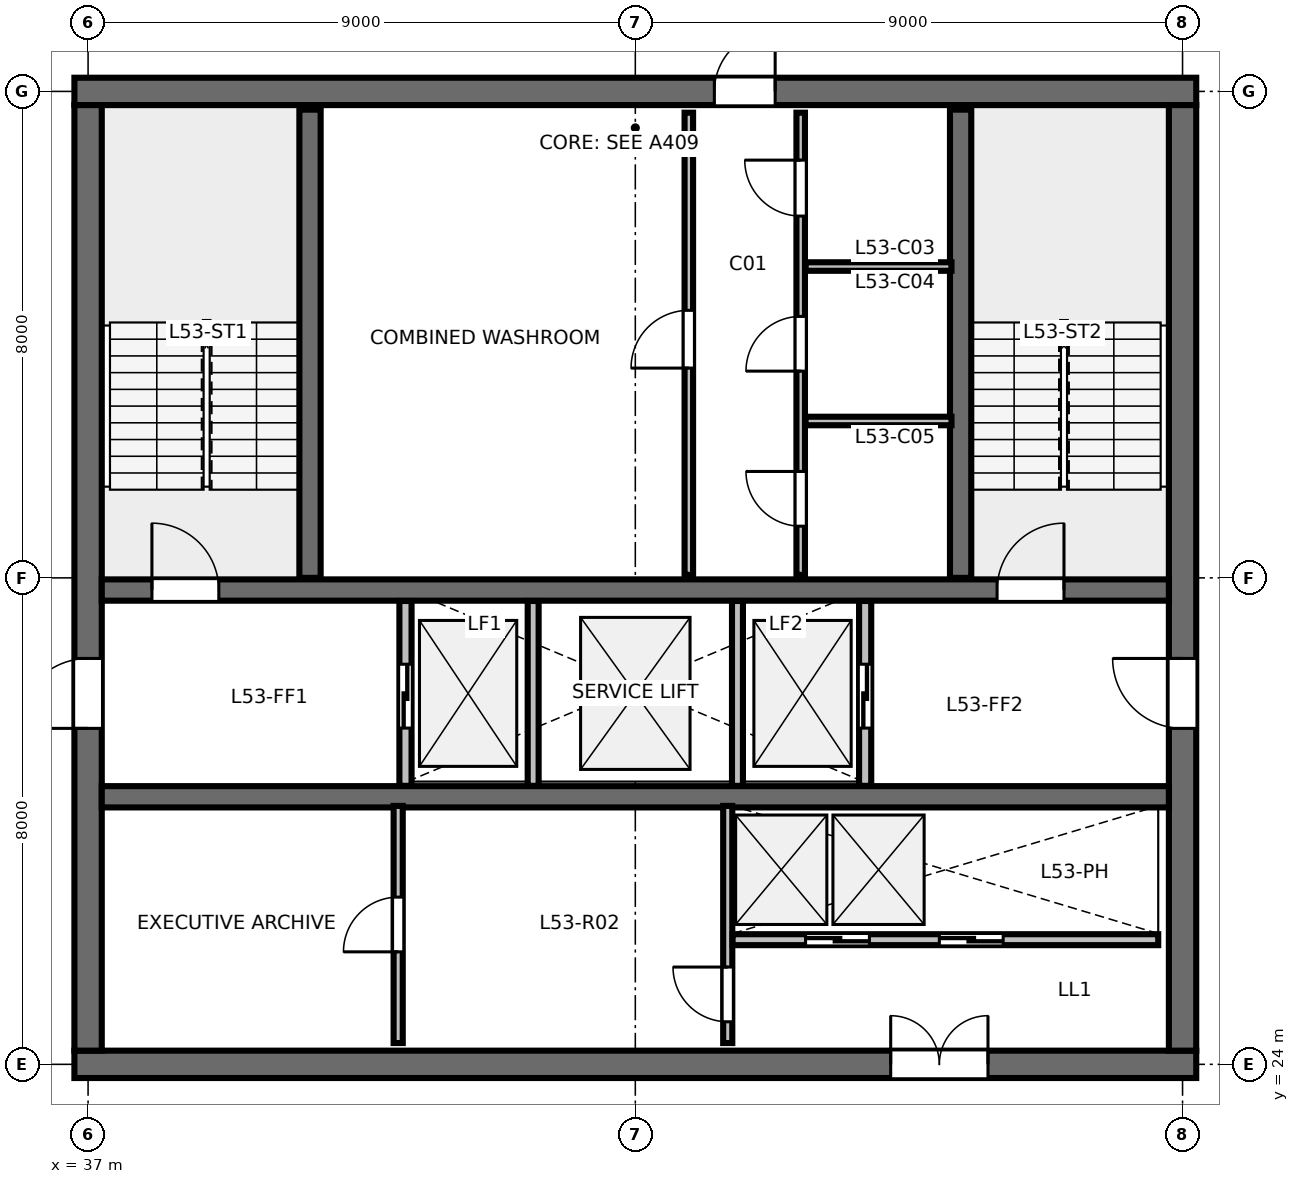
"""IFC4 building model, lengths in metres.
Left out: names, types, materials, properties, quantities, classifications, styles, units other than length and angle.
Written with IfcOpenShell. Run it as: python <this file> out.ifc"""

import sys

from ifc_helpers import new_model, si_unit, direction, frame, frame_2d, origin, place, context, subcontext, project, spatial, rectangle, extrude, element, fill, save


model = new_model("IFC4")
c1 = context("Model", 3, precision=1e-05, world=origin(), true_north=direction((0.0, 1.0)))
c2 = subcontext(c1, "Body", "Model", "MODEL_VIEW")
j1 = project(units=[si_unit("LENGTHUNIT", "METRE"), si_unit("PLANEANGLEUNIT", "RADIAN")], contexts=[c1])
p1 = place(None, origin())
s1 = spatial("IfcSite", under=j1, at=p1, CompositionType="ELEMENT")
p2 = place(p1, origin())
s2 = spatial("IfcBuilding", under=s1, at=p2, CompositionType="ELEMENT")
p3 = place(p2, frame((0.0, 0.0, 202.2)))
s3 = spatial("IfcBuildingStorey", under=s2, at=p3, CompositionType="ELEMENT", Elevation=202.2)
p4 = place(p3, frame((36.775, 24.0, 0.0), z_axis=(0.0, 0.0, 1.0), x_axis=(1.0, 0.0, 0.0)))
e1 = element("IfcWall", 1, at=p4, inside=s3, PredefinedType="SHEAR", context=c2, shape_type="SweptSolid", body=[
    extrude(rectangle(XDim=18.45, YDim=0.45, at=frame_2d((9.225, 0.0))), origin(), (0.0, 0.0, 1.0), 3.36),
])
p5 = place(p4, frame((13.425, 0.0, 0.0)))
e2 = element("IfcOpeningElement", 2, at=p5, cuts=e1, PredefinedType="OPENING", context=c2, shape_type="SweptSolid", body=[
    extrude(rectangle(XDim=1.6, YDim=2.15, at=frame_2d((0.8, 1.075))), frame((0.0, 0.235, 0.0), z_axis=(0.0, -1.0, 0.0), x_axis=(1.0, 0.0, 0.0)), (0.0, 0.0, 1.0), 0.47),
])
p6 = place(p3, frame((36.775, 40.0, 0.0), z_axis=(0.0, 0.0, 1.0), x_axis=(1.0, 0.0, 0.0)))
e3 = element("IfcWall", 3, at=p6, inside=s3, PredefinedType="SHEAR", context=c2, shape_type="SweptSolid", body=[
    extrude(rectangle(XDim=18.45, YDim=0.45, at=frame_2d((9.225, 0.0))), origin(), (0.0, 0.0, 1.0), 3.36),
])
p7 = place(p6, frame((10.525, 0.0, 0.0)))
e4 = element("IfcOpeningElement", 4, at=p7, cuts=e3, PredefinedType="OPENING", context=c2, shape_type="SweptSolid", body=[
    extrude(rectangle(XDim=1.0, YDim=2.15, at=frame_2d((0.5, 1.075))), frame((0.0, 0.235, 0.0), z_axis=(0.0, -1.0, 0.0), x_axis=(1.0, 0.0, 0.0)), (0.0, 0.0, 1.0), 0.47),
])
p8 = place(p3, frame((37.0, 24.225, 0.0), z_axis=(0.0, 0.0, 1.0), x_axis=(0.0, 1.0, 0.0)))
e5 = element("IfcWall", 5, at=p8, inside=s3, PredefinedType="SHEAR", context=c2, shape_type="SweptSolid", body=[
    extrude(rectangle(XDim=15.55, YDim=0.45, at=frame_2d((7.775, 0.0))), origin(), (0.0, 0.0, 1.0), 3.36),
])
p9 = place(p8, frame((5.3, 0.0, 0.0)))
e6 = element("IfcOpeningElement", 6, at=p9, cuts=e5, PredefinedType="OPENING", context=c2, shape_type="SweptSolid", body=[
    extrude(rectangle(XDim=1.15, YDim=2.15, at=frame_2d((0.575, 1.075))), frame((0.0, 0.235, 0.0), z_axis=(0.0, -1.0, 0.0), x_axis=(1.0, 0.0, 0.0)), (0.0, 0.0, 1.0), 0.47),
])
p10 = place(p3, frame((55.0, 24.225, 0.0), z_axis=(0.0, 0.0, 1.0), x_axis=(0.0, 1.0, 0.0)))
e7 = element("IfcWall", 7, at=p10, inside=s3, PredefinedType="SHEAR", context=c2, shape_type="SweptSolid", body=[
    extrude(rectangle(XDim=15.55, YDim=0.45, at=frame_2d((7.775, 0.0))), origin(), (0.0, 0.0, 1.0), 3.36),
])
p11 = place(p10, frame((5.3, 0.0, 0.0)))
e8 = element("IfcOpeningElement", 8, at=p11, cuts=e7, PredefinedType="OPENING", context=c2, shape_type="SweptSolid", body=[
    extrude(rectangle(XDim=1.15, YDim=2.15, at=frame_2d((0.575, 1.075))), frame((0.0, 0.235, 0.0), z_axis=(0.0, -1.0, 0.0), x_axis=(1.0, 0.0, 0.0)), (0.0, 0.0, 1.0), 0.47),
])
p12 = place(p3, frame((37.225, 31.8, 0.0), z_axis=(0.0, 0.0, 1.0), x_axis=(1.0, 0.0, 0.0)))
e9 = element("IfcWall", 9, at=p12, inside=s3, PredefinedType="SHEAR", context=c2, shape_type="SweptSolid", body=[
    extrude(rectangle(XDim=17.55, YDim=0.35, at=frame_2d((8.775, 0.0))), origin(), (0.0, 0.0, 1.0), 3.36),
])
p13 = place(p12, frame((0.825, 0.0, 0.0)))
e10 = element("IfcOpeningElement", 10, at=p13, cuts=e9, PredefinedType="OPENING", context=c2, shape_type="SweptSolid", body=[
    extrude(rectangle(XDim=1.1, YDim=2.15, at=frame_2d((0.55, 1.075))), frame((0.0, 0.185, 0.0), z_axis=(0.0, -1.0, 0.0), x_axis=(1.0, 0.0, 0.0)), (0.0, 0.0, 1.0), 0.37),
])
p14 = place(p12, frame((14.725, 0.0, 0.0)))
e11 = element("IfcOpeningElement", 11, at=p14, cuts=e9, PredefinedType="OPENING", context=c2, shape_type="SweptSolid", body=[
    extrude(rectangle(XDim=1.1, YDim=2.15, at=frame_2d((0.55, 1.075))), frame((0.0, 0.185, 0.0), z_axis=(0.0, -1.0, 0.0), x_axis=(1.0, 0.0, 0.0)), (0.0, 0.0, 1.0), 0.37),
])
p15 = place(p3, frame((37.225, 28.4, 0.0), z_axis=(0.0, 0.0, 1.0), x_axis=(1.0, 0.0, 0.0)))
e12 = element("IfcWall", 12, at=p15, inside=s3, PredefinedType="SHEAR", context=c2, shape_type="SweptSolid", body=[
    extrude(rectangle(XDim=17.55, YDim=0.35, at=frame_2d((8.775, 0.0))), origin(), (0.0, 0.0, 1.0), 3.36),
])
for number, where, z_axis, x_axis in (
    (13, (40.65, 32.0, 0.0), (0.0, 0.0, 1.0), (0.0, 1.0, 0.0)),
    (14, (51.35, 32.0, 0.0), (0.0, 0.0, 1.0), (0.0, 1.0, 0.0)),
):
    element("IfcWall", number, at=place(p3, frame(where, z_axis=z_axis, x_axis=x_axis)), inside=s3, PredefinedType="SHEAR", context=c2, shape_type="SweptSolid", body=[
        extrude(rectangle(XDim=7.7, YDim=0.35, at=frame_2d((3.85, 0.0))), origin(), (0.0, 0.0, 1.0), 3.6),
    ])
p16 = place(p3, frame((46.88, 32.05, 0.0), z_axis=(0.0, 0.0, 1.0), x_axis=(0.0, 1.0, 0.0)))
e15 = element("IfcWall", 15, at=p16, inside=s3, PredefinedType="PARTITIONING", context=c2, shape_type="SweptSolid", body=[
    extrude(rectangle(XDim=7.6, YDim=0.14, at=frame_2d((3.8, 0.0))), origin(), (0.0, 0.0, 1.0), 3.375),
])
p17 = place(p16, frame((3.4, 0.0, 0.0)))
e16 = element("IfcOpeningElement", 16, at=p17, cuts=e15, PredefinedType="OPENING", context=c2, shape_type="SweptSolid", body=[
    extrude(rectangle(XDim=0.95, YDim=2.15, at=frame_2d((0.475, 1.075))), frame((0.0, 0.08, 0.0), z_axis=(0.0, -1.0, 0.0), x_axis=(1.0, 0.0, 0.0)), (0.0, 0.0, 1.0), 0.16),
])
p18 = place(p3, frame((48.72, 32.05, 0.0), z_axis=(0.0, 0.0, 1.0), x_axis=(0.0, 1.0, 0.0)))
e17 = element("IfcWall", 17, at=p18, inside=s3, PredefinedType="PARTITIONING", context=c2, shape_type="SweptSolid", body=[
    extrude(rectangle(XDim=7.6, YDim=0.14, at=frame_2d((3.8, 0.0))), origin(), (0.0, 0.0, 1.0), 3.375),
])
p19 = place(p18, frame((0.8, 0.0, 0.0)))
e18 = element("IfcOpeningElement", 18, at=p19, cuts=e17, PredefinedType="OPENING", context=c2, shape_type="SweptSolid", body=[
    extrude(rectangle(XDim=0.9, YDim=2.15, at=frame_2d((0.45, 1.075))), frame((0.0, 0.08, 0.0), z_axis=(0.0, -1.0, 0.0), x_axis=(1.0, 0.0, 0.0)), (0.0, 0.0, 1.0), 0.16),
])
p20 = place(p18, frame((3.35, 0.0, 0.0)))
e19 = element("IfcOpeningElement", 19, at=p20, cuts=e17, PredefinedType="OPENING", context=c2, shape_type="SweptSolid", body=[
    extrude(rectangle(XDim=0.9, YDim=2.15, at=frame_2d((0.45, 1.075))), frame((0.0, 0.08, 0.0), z_axis=(0.0, -1.0, 0.0), x_axis=(1.0, 0.0, 0.0)), (0.0, 0.0, 1.0), 0.16),
])
p21 = place(p18, frame((5.9, 0.0, 0.0)))
e20 = element("IfcOpeningElement", 20, at=p21, cuts=e17, PredefinedType="OPENING", context=c2, shape_type="SweptSolid", body=[
    extrude(rectangle(XDim=0.92, YDim=2.15, at=frame_2d((0.46, 1.075))), frame((0.0, 0.08, 0.0), z_axis=(0.0, -1.0, 0.0), x_axis=(1.0, 0.0, 0.0)), (0.0, 0.0, 1.0), 0.16),
])
for number, where, z_axis, x_axis in (
    (21, (48.8, 34.58, 0.0), (0.0, 0.0, 1.0), (1.0, 0.0, 0.0)),
    (22, (48.8, 37.12, 0.0), (0.0, 0.0, 1.0), (1.0, 0.0, 0.0)),
):
    element("IfcWall", number, at=place(p3, frame(where, z_axis=z_axis, x_axis=x_axis)), inside=s3, PredefinedType="PARTITIONING", context=c2, shape_type="SweptSolid", body=[
        extrude(rectangle(XDim=2.4, YDim=0.14, at=frame_2d((1.2, 0.0))), origin(), (0.0, 0.0, 1.0), 3.375),
    ])
p22 = place(p3, frame((42.22, 28.58, 0.0), z_axis=(0.0, 0.0, 1.0), x_axis=(0.0, 1.0, 0.0)))
e23 = element("IfcWall", 23, at=p22, inside=s3, PredefinedType="PARTITIONING", context=c2, shape_type="SweptSolid", body=[
    extrude(rectangle(XDim=3.04, YDim=0.2, at=frame_2d((1.52, 0.0))), origin(), (0.0, 0.0, 1.0), 3.375),
])
p23 = place(p22, frame((0.95, 0.0, 0.0)))
e24 = element("IfcOpeningElement", 24, at=p23, cuts=e23, PredefinedType="OPENING", context=c2, shape_type="SweptSolid", body=[
    extrude(rectangle(XDim=1.05, YDim=2.15, at=frame_2d((0.525, 1.075))), frame((0.0, 0.11, 0.0), z_axis=(0.0, -1.0, 0.0), x_axis=(1.0, 0.0, 0.0)), (0.0, 0.0, 1.0), 0.22),
])
p24 = place(p3, frame((49.78, 28.58, 0.0), z_axis=(0.0, 0.0, 1.0), x_axis=(0.0, 1.0, 0.0)))
e25 = element("IfcWall", 25, at=p24, inside=s3, PredefinedType="PARTITIONING", context=c2, shape_type="SweptSolid", body=[
    extrude(rectangle(XDim=3.04, YDim=0.2, at=frame_2d((1.52, 0.0))), origin(), (0.0, 0.0, 1.0), 3.375),
])
p25 = place(p24, frame((0.95, 0.0, 0.0)))
e26 = element("IfcOpeningElement", 26, at=p25, cuts=e25, PredefinedType="OPENING", context=c2, shape_type="SweptSolid", body=[
    extrude(rectangle(XDim=1.05, YDim=2.15, at=frame_2d((0.525, 1.075))), frame((0.0, 0.11, 0.0), z_axis=(0.0, -1.0, 0.0), x_axis=(1.0, 0.0, 0.0)), (0.0, 0.0, 1.0), 0.22),
])
for number, where, z_axis, x_axis in (
    (27, (44.32, 28.58, 0.0), (0.0, 0.0, 1.0), (0.0, 1.0, 0.0)),
    (28, (47.68, 28.58, 0.0), (0.0, 0.0, 1.0), (0.0, 1.0, 0.0)),
):
    element("IfcWall", number, at=place(p3, frame(where, z_axis=z_axis, x_axis=x_axis)), inside=s3, PredefinedType="PARTITIONING", context=c2, shape_type="SweptSolid", body=[
        extrude(rectangle(XDim=3.04, YDim=0.18, at=frame_2d((1.52, 0.0))), origin(), (0.0, 0.0, 1.0), 3.375),
    ])
p26 = place(p3, frame((42.1, 24.35, 0.0), z_axis=(0.0, 0.0, 1.0), x_axis=(0.0, 1.0, 0.0)))
e29 = element("IfcWall", 29, at=p26, inside=s3, PredefinedType="PARTITIONING", context=c2, shape_type="SweptSolid", body=[
    extrude(rectangle(XDim=3.9, YDim=0.15, at=frame_2d((1.95, 0.0))), origin(), (0.0, 0.0, 1.0), 3.375),
])
p27 = place(p26, frame((1.5, 0.0, 0.0)))
e30 = element("IfcOpeningElement", 30, at=p27, cuts=e29, PredefinedType="OPENING", context=c2, shape_type="SweptSolid", body=[
    extrude(rectangle(XDim=0.9, YDim=2.15, at=frame_2d((0.45, 1.075))), frame((0.0, 0.085, 0.0), z_axis=(0.0, -1.0, 0.0), x_axis=(1.0, 0.0, 0.0)), (0.0, 0.0, 1.0), 0.17),
])
p28 = place(p3, frame((47.52, 24.35, 0.0), z_axis=(0.0, 0.0, 1.0), x_axis=(0.0, 1.0, 0.0)))
e31 = element("IfcWall", 31, at=p28, inside=s3, PredefinedType="PARTITIONING", context=c2, shape_type="SweptSolid", body=[
    extrude(rectangle(XDim=3.9, YDim=0.15, at=frame_2d((1.95, 0.0))), origin(), (0.0, 0.0, 1.0), 3.375),
])
p29 = place(p28, frame((0.35, 0.0, 0.0)))
e32 = element("IfcOpeningElement", 32, at=p29, cuts=e31, PredefinedType="OPENING", context=c2, shape_type="SweptSolid", body=[
    extrude(rectangle(XDim=0.9, YDim=2.15, at=frame_2d((0.45, 1.075))), frame((0.0, 0.085, 0.0), z_axis=(0.0, -1.0, 0.0), x_axis=(1.0, 0.0, 0.0)), (0.0, 0.0, 1.0), 0.17),
])
p30 = place(p3, frame((47.6, 26.05, 0.0), z_axis=(0.0, 0.0, 1.0), x_axis=(1.0, 0.0, 0.0)))
e33 = element("IfcWall", 33, at=p30, inside=s3, PredefinedType="PARTITIONING", context=c2, shape_type="SweptSolid", body=[
    extrude(rectangle(XDim=7.0, YDim=0.18, at=frame_2d((3.5, 0.0))), origin(), (0.0, 0.0, 1.0), 3.375),
])
p31 = place(p30, frame((1.2, 0.0, 0.0)))
e34 = element("IfcOpeningElement", 34, at=p31, cuts=e33, PredefinedType="OPENING", context=c2, shape_type="SweptSolid", body=[
    extrude(rectangle(XDim=1.05, YDim=2.15, at=frame_2d((0.525, 1.075))), frame((0.0, 0.1, 0.0), z_axis=(0.0, -1.0, 0.0), x_axis=(1.0, 0.0, 0.0)), (0.0, 0.0, 1.0), 0.2),
])
p32 = place(p30, frame((3.4, 0.0, 0.0)))
e35 = element("IfcOpeningElement", 35, at=p32, cuts=e33, PredefinedType="OPENING", context=c2, shape_type="SweptSolid", body=[
    extrude(rectangle(XDim=1.05, YDim=2.15, at=frame_2d((0.525, 1.075))), frame((0.0, 0.1, 0.0), z_axis=(0.0, -1.0, 0.0), x_axis=(1.0, 0.0, 0.0)), (0.0, 0.0, 1.0), 0.2),
])
p33 = place(p13, origin())
e36 = element("IfcDoor", 36, at=p33, inside=s3, OperationType="SINGLE_SWING_LEFT", PredefinedType="DOOR", context=c2, shape_type="SweptSolid", body=[
    extrude(rectangle(XDim=1.1, YDim=2.15, at=frame_2d((0.55, 1.075))), frame((0.0, 0.025, 0.0), z_axis=(0.0, -1.0, 0.0), x_axis=(1.0, 0.0, 0.0)), (0.0, 0.0, 1.0), 0.05),
])
fill(e10, e36)
p34 = place(p14, origin())
e37 = element("IfcDoor", 37, at=p34, inside=s3, OperationType="SINGLE_SWING_RIGHT", PredefinedType="DOOR", context=c2, shape_type="SweptSolid", body=[
    extrude(rectangle(XDim=1.1, YDim=2.15, at=frame_2d((0.55, 1.075))), frame((0.0, 0.025, 0.0), z_axis=(0.0, -1.0, 0.0), x_axis=(1.0, 0.0, 0.0)), (0.0, 0.0, 1.0), 0.05),
])
fill(e11, e37)
p35 = place(p7, origin())
e38 = element("IfcDoor", 38, at=p35, inside=s3, OperationType="SINGLE_SWING_RIGHT", PredefinedType="DOOR", context=c2, shape_type="SweptSolid", body=[
    extrude(rectangle(XDim=1.0, YDim=2.15, at=frame_2d((0.5, 1.075))), frame((0.0, 0.025, 0.0), z_axis=(0.0, -1.0, 0.0), x_axis=(1.0, 0.0, 0.0)), (0.0, 0.0, 1.0), 0.05),
])
fill(e4, e38)
p36 = place(p9, origin())
e39 = element("IfcDoor", 39, at=p36, inside=s3, OperationType="SINGLE_SWING_LEFT", PredefinedType="DOOR", context=c2, shape_type="SweptSolid", body=[
    extrude(rectangle(XDim=1.15, YDim=2.15, at=frame_2d((0.575, 1.075))), frame((0.0, 0.025, 0.0), z_axis=(0.0, -1.0, 0.0), x_axis=(1.0, 0.0, 0.0)), (0.0, 0.0, 1.0), 0.05),
])
fill(e6, e39)
p37 = place(p11, origin())
e40 = element("IfcDoor", 40, at=p37, inside=s3, OperationType="SINGLE_SWING_RIGHT", PredefinedType="DOOR", context=c2, shape_type="SweptSolid", body=[
    extrude(rectangle(XDim=1.15, YDim=2.15, at=frame_2d((0.575, 1.075))), frame((0.0, 0.025, 0.0), z_axis=(0.0, -1.0, 0.0), x_axis=(1.0, 0.0, 0.0)), (0.0, 0.0, 1.0), 0.05),
])
fill(e8, e40)
p38 = place(p5, origin())
e41 = element("IfcDoor", 41, at=p38, inside=s3, OperationType="DOUBLE_DOOR_SINGLE_SWING", PredefinedType="DOOR", context=c2, shape_type="SweptSolid", body=[
    extrude(rectangle(XDim=1.6, YDim=2.15, at=frame_2d((0.8, 1.075))), frame((0.0, 0.025, 0.0), z_axis=(0.0, -1.0, 0.0), x_axis=(1.0, 0.0, 0.0)), (0.0, 0.0, 1.0), 0.05),
])
fill(e2, e41)
p39 = place(p17, origin())
e42 = element("IfcDoor", 42, at=p39, inside=s3, OperationType="SINGLE_SWING_LEFT", PredefinedType="DOOR", context=c2, shape_type="SweptSolid", body=[
    extrude(rectangle(XDim=0.95, YDim=2.15, at=frame_2d((0.475, 1.075))), frame((0.0, 0.025, 0.0), z_axis=(0.0, -1.0, 0.0), x_axis=(1.0, 0.0, 0.0)), (0.0, 0.0, 1.0), 0.05),
])
fill(e16, e42)
p40 = place(p19, origin())
e43 = element("IfcDoor", 43, at=p40, inside=s3, OperationType="SINGLE_SWING_RIGHT", PredefinedType="DOOR", context=c2, shape_type="SweptSolid", body=[
    extrude(rectangle(XDim=0.9, YDim=2.15, at=frame_2d((0.45, 1.075))), frame((0.0, 0.025, 0.0), z_axis=(0.0, -1.0, 0.0), x_axis=(1.0, 0.0, 0.0)), (0.0, 0.0, 1.0), 0.05),
])
fill(e18, e43)
p41 = place(p20, origin())
e44 = element("IfcDoor", 44, at=p41, inside=s3, OperationType="SINGLE_SWING_LEFT", PredefinedType="DOOR", context=c2, shape_type="SweptSolid", body=[
    extrude(rectangle(XDim=0.9, YDim=2.15, at=frame_2d((0.45, 1.075))), frame((0.0, 0.025, 0.0), z_axis=(0.0, -1.0, 0.0), x_axis=(1.0, 0.0, 0.0)), (0.0, 0.0, 1.0), 0.05),
])
fill(e19, e44)
p42 = place(p21, origin())
e45 = element("IfcDoor", 45, at=p42, inside=s3, OperationType="SINGLE_SWING_RIGHT", PredefinedType="DOOR", context=c2, shape_type="SweptSolid", body=[
    extrude(rectangle(XDim=0.92, YDim=2.15, at=frame_2d((0.46, 1.075))), frame((0.0, 0.025, 0.0), z_axis=(0.0, -1.0, 0.0), x_axis=(1.0, 0.0, 0.0)), (0.0, 0.0, 1.0), 0.05),
])
fill(e20, e45)
p43 = place(p23, origin())
e46 = element("IfcDoor", 46, at=p43, inside=s3, OperationType="SLIDING_TO_LEFT", PredefinedType="DOOR", context=c2, shape_type="SweptSolid", body=[
    extrude(rectangle(XDim=1.05, YDim=2.15, at=frame_2d((0.525, 1.075))), frame((0.0, 0.025, 0.0), z_axis=(0.0, -1.0, 0.0), x_axis=(1.0, 0.0, 0.0)), (0.0, 0.0, 1.0), 0.05),
])
fill(e24, e46)
p44 = place(p25, origin())
e47 = element("IfcDoor", 47, at=p44, inside=s3, OperationType="SLIDING_TO_RIGHT", PredefinedType="DOOR", context=c2, shape_type="SweptSolid", body=[
    extrude(rectangle(XDim=1.05, YDim=2.15, at=frame_2d((0.525, 1.075))), frame((0.0, 0.025, 0.0), z_axis=(0.0, -1.0, 0.0), x_axis=(1.0, 0.0, 0.0)), (0.0, 0.0, 1.0), 0.05),
])
fill(e26, e47)
p45 = place(p27, origin())
e48 = element("IfcDoor", 48, at=p45, inside=s3, OperationType="SINGLE_SWING_LEFT", PredefinedType="DOOR", context=c2, shape_type="SweptSolid", body=[
    extrude(rectangle(XDim=0.9, YDim=2.15, at=frame_2d((0.45, 1.075))), frame((0.0, 0.025, 0.0), z_axis=(0.0, -1.0, 0.0), x_axis=(1.0, 0.0, 0.0)), (0.0, 0.0, 1.0), 0.05),
])
fill(e30, e48)
p46 = place(p29, origin())
e49 = element("IfcDoor", 49, at=p46, inside=s3, OperationType="SINGLE_SWING_RIGHT", PredefinedType="DOOR", context=c2, shape_type="SweptSolid", body=[
    extrude(rectangle(XDim=0.9, YDim=2.15, at=frame_2d((0.45, 1.075))), frame((0.0, 0.025, 0.0), z_axis=(0.0, -1.0, 0.0), x_axis=(1.0, 0.0, 0.0)), (0.0, 0.0, 1.0), 0.05),
])
fill(e32, e49)
p47 = place(p31, origin())
e50 = element("IfcDoor", 50, at=p47, inside=s3, OperationType="SLIDING_TO_LEFT", PredefinedType="DOOR", context=c2, shape_type="SweptSolid", body=[
    extrude(rectangle(XDim=1.05, YDim=2.15, at=frame_2d((0.525, 1.075))), frame((0.0, 0.025, 0.0), z_axis=(0.0, -1.0, 0.0), x_axis=(1.0, 0.0, 0.0)), (0.0, 0.0, 1.0), 0.05),
])
fill(e34, e50)
p48 = place(p32, origin())
e51 = element("IfcDoor", 51, at=p48, inside=s3, OperationType="SLIDING_TO_RIGHT", PredefinedType="DOOR", context=c2, shape_type="SweptSolid", body=[
    extrude(rectangle(XDim=1.05, YDim=2.15, at=frame_2d((0.525, 1.075))), frame((0.0, 0.025, 0.0), z_axis=(0.0, -1.0, 0.0), x_axis=(1.0, 0.0, 0.0)), (0.0, 0.0, 1.0), 0.05),
])
fill(e35, e51)
save(model, sys.argv[1])
